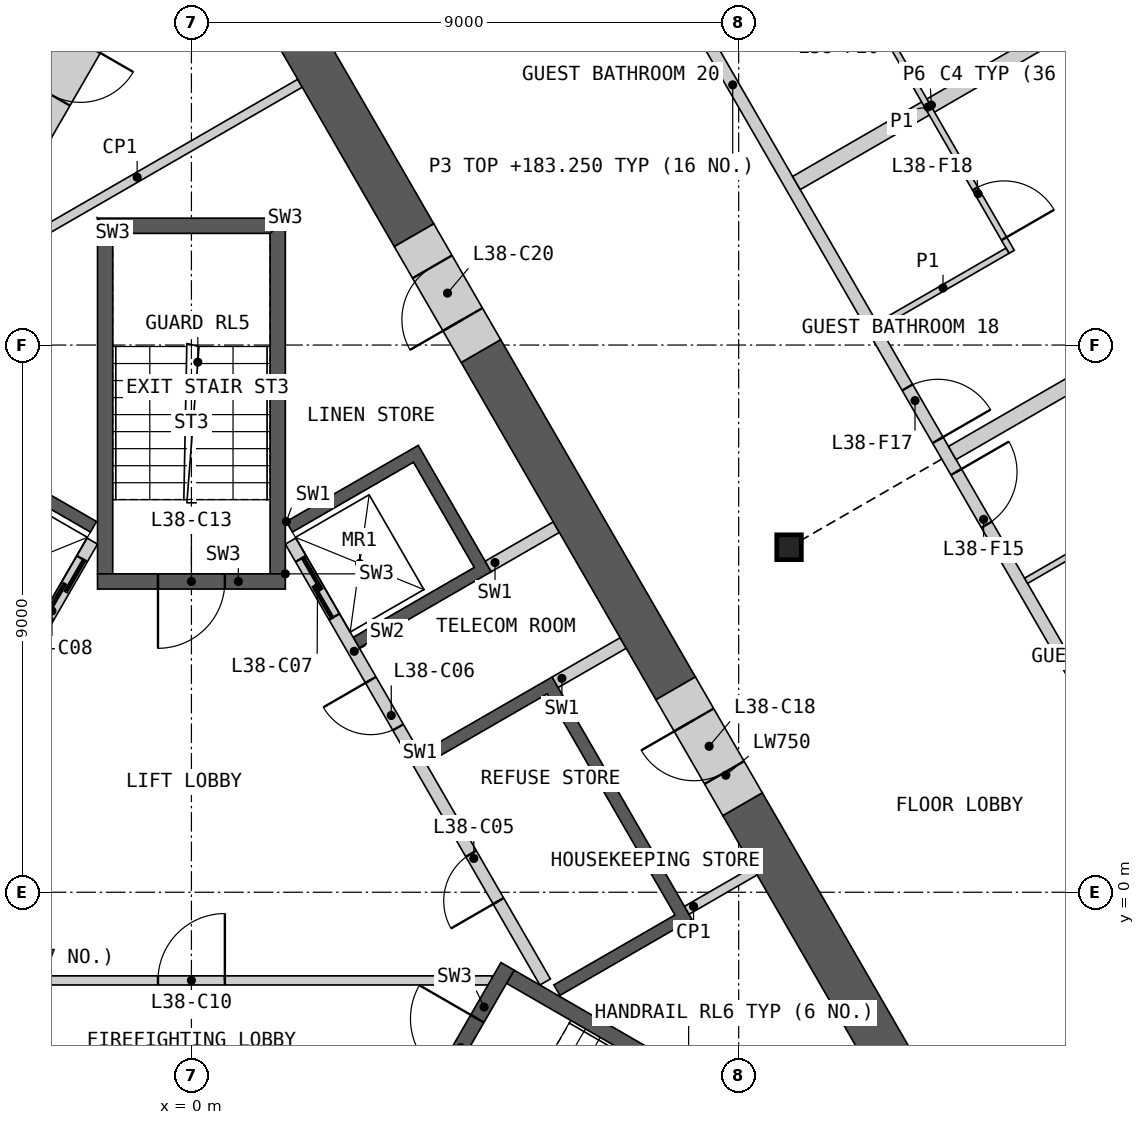
"""IFC4 building model, lengths in metres.
Left out: names, types, materials, properties, quantities, classifications, styles, units other than length and angle.
Written with IfcOpenShell. Run it as: python <this file> out.ifc"""

import sys

from ifc_helpers import new_model, si_unit, direction, frame, frame_2d, origin, origin_2d, place, context, subcontext, project, spatial, polyline, rectangle, i_section, outline, extrude, element, fill, save


model = new_model("IFC4")
c1 = context("Model", 3, precision=1e-05, world=origin(), true_north=direction((0.0, 1.0)))
c2 = subcontext(c1, "Body", "Model", "MODEL_VIEW")
j1 = project(units=[si_unit("LENGTHUNIT", "METRE"), si_unit("PLANEANGLEUNIT", "RADIAN")], contexts=[c1])
p1 = place(None, origin())
s1 = spatial("IfcSite", under=j1, at=p1, CompositionType="ELEMENT")
p2 = place(p1, origin())
s2 = spatial("IfcBuilding", under=s1, at=p2, CompositionType="ELEMENT")
p3 = place(p2, frame((0.0, 0.0, 180.0)))
s3 = spatial("IfcBuildingStorey", under=s2, at=p3, CompositionType="ELEMENT", Elevation=180.0)
p4 = place(p3, frame((9.828, 5.675, 0.0), z_axis=(0.0, 0.0, 1.0), x_axis=(1.0, 0.0, 0.0)))
e1 = element("IfcColumn", 1, at=p4, inside=s3, PredefinedType="COLUMN", context=c2, shape_type="SweptSolid", body=[
    extrude(i_section(OverallWidth=0.404, OverallDepth=0.407, WebThickness=0.027, FlangeThickness=0.044, at=origin_2d()), origin(), (0.0, 0.0, 1.0), 3.6),
])
p5 = place(p3, origin())
e2 = element("IfcWall", 2, at=p5, inside=s3, PredefinedType="SHEAR", context=c2, shape_type="SweptSolid", body=[
    extrude(outline(polyline([(1.561, 6.097), (3.731, 7.35), (4.931, 5.272), (2.76, 4.019), (2.66, 4.192), (4.652, 5.342), (3.652, 7.074), (1.66, 5.924), (1.561, 6.097)])), origin(), (0.0, 0.0, 1.0), 3.25),
])
p6 = place(p3, origin())
e3 = element("IfcWall", 3, at=p6, inside=s3, PredefinedType="SHEAR", context=c2, shape_type="SweptSolid", body=[
    extrude(outline(polyline([(3.76, 2.287), (5.931, 3.54), (8.231, -0.444), (6.061, -1.697), (5.96, -1.524), (7.952, -0.374), (5.852, 3.263), (3.861, 2.113), (3.76, 2.287)])), origin(), (0.0, 0.0, 1.0), 3.25),
])
p7 = place(p3, frame((5.817, -1.476, 0.0), z_axis=(0.0, 0.0, 1.0), x_axis=(-0.500002616675, 0.866023893041, 0.0)))
e4 = element("IfcWall", 4, at=p7, inside=s3, PredefinedType="SOLIDWALL", context=c2, shape_type="SweptSolid", body=[
    extrude(rectangle(XDim=8.373, YDim=0.2, at=frame_2d((4.187, 0.0))), origin(), (0.0, 0.0, 1.0), 3.25),
])
p8 = place(p7, frame((1.537, 0.0, 0.0)))
e5 = element("IfcOpeningElement", 5, at=p8, cuts=e4, PredefinedType="OPENING", context=c2, shape_type="SweptSolid", body=[
    extrude(rectangle(XDim=0.9, YDim=2.1, at=frame_2d((0.45, 1.05))), frame((0.0, 0.11, 0.0), z_axis=(0.0, -1.0, 0.0), x_axis=(1.0, 0.0, 0.0)), (0.0, 0.0, 1.0), 0.22),
])
p9 = place(p7, frame((4.837, 0.0, 0.0)))
e6 = element("IfcOpeningElement", 6, at=p9, cuts=e4, PredefinedType="OPENING", context=c2, shape_type="SweptSolid", body=[
    extrude(rectangle(XDim=0.9, YDim=2.1, at=frame_2d((0.45, 1.05))), frame((0.0, 0.11, 0.0), z_axis=(0.0, -1.0, 0.0), x_axis=(1.0, 0.0, 0.0)), (0.0, 0.0, 1.0), 0.22),
])
p10 = place(p7, frame((6.937, 0.0, 0.0)))
e7 = element("IfcOpeningElement", 7, at=p10, cuts=e4, PredefinedType="OPENING", context=c2, shape_type="SweptSolid", body=[
    extrude(rectangle(XDim=1.1, YDim=2.1, at=frame_2d((0.55, 1.05))), frame((0.0, 0.11, 0.0), z_axis=(0.0, -1.0, 0.0), x_axis=(1.0, 0.0, 0.0)), (0.0, 0.0, 1.0), 0.22),
])
p11 = place(p3, frame((5.981, 3.453, 0.0), z_axis=(0.0, 0.0, 1.0), x_axis=(0.865968639725, 0.500098305348, 0.0)))
e8 = element("IfcWall", 8, at=p11, inside=s3, PredefinedType="SHEAR", context=c2, shape_type="SweptSolid", body=[
    extrude(rectangle(XDim=1.293, YDim=0.2, at=frame_2d((0.646, 0.0))), origin(), (0.0, 0.0, 1.0), 3.25),
])
p12 = place(p3, frame((4.881, 5.358, 0.0), z_axis=(0.0, 0.0, 1.0), x_axis=(0.866084958089, 0.499896834728, 0.0)))
e9 = element("IfcWall", 9, at=p12, inside=s3, PredefinedType="SHEAR", context=c2, shape_type="SweptSolid", body=[
    extrude(rectangle(XDim=1.293, YDim=0.2, at=frame_2d((0.646, 0.0))), origin(), (0.0, 0.0, 1.0), 3.25),
])
p13 = place(p3, origin())
e10 = element("IfcWall", 10, at=p13, inside=s3, PredefinedType="SHEAR", context=c2, shape_type="SweptSolid", body=[
    extrude(outline(polyline([(-4.96, 0.208), (-7.131, 1.461), (-3.731, 7.35), (-1.561, 6.097), (-1.66, 5.924), (-3.652, 7.074), (-4.652, 5.342), (-2.66, 4.192), (-2.76, 4.019), (-4.752, 5.169), (-5.752, 3.437), (-3.76, 2.287), (-3.861, 2.113), (-5.852, 3.263), (-6.852, 1.531), (-4.861, 0.381), (-4.96, 0.208)])), origin(), (0.0, 0.0, 1.0), 3.25),
])
p14 = place(p3, frame((-1.631, 5.776, 0.0), z_axis=(0.0, 0.0, 1.0), x_axis=(-0.499992876559, -0.866029516466, 0.0)))
e11 = element("IfcWall", 11, at=p14, inside=s3, PredefinedType="SOLIDWALL", context=c2, shape_type="SweptSolid", body=[
    extrude(rectangle(XDim=6.486, YDim=0.2, at=frame_2d((3.243, 0.0))), origin(), (0.0, 0.0, 1.0), 3.25),
])
p15 = place(p14, frame((0.337, 0.0, 0.0)))
e12 = element("IfcOpeningElement", 12, at=p15, cuts=e11, PredefinedType="OPENING", context=c2, shape_type="SweptSolid", body=[
    extrude(rectangle(XDim=1.1, YDim=2.1, at=frame_2d((0.55, 1.05))), frame((0.0, 0.11, 0.0), z_axis=(0.0, -1.0, 0.0), x_axis=(1.0, 0.0, 0.0)), (0.0, 0.0, 1.0), 0.22),
])
p16 = place(p14, frame((2.537, 0.0, 0.0)))
e13 = element("IfcOpeningElement", 13, at=p16, cuts=e11, PredefinedType="OPENING", context=c2, shape_type="SweptSolid", body=[
    extrude(rectangle(XDim=1.1, YDim=2.1, at=frame_2d((0.55, 1.05))), frame((0.0, 0.11, 0.0), z_axis=(0.0, -1.0, 0.0), x_axis=(1.0, 0.0, 0.0)), (0.0, 0.0, 1.0), 0.22),
])
p17 = place(p3, frame((-4.941, -1.45, 0.0), z_axis=(0.0, 0.0, 1.0), x_axis=(1.0, 0.0, 0.0)))
e14 = element("IfcWall", 14, at=p17, inside=s3, PredefinedType="PARTITIONING", context=c2, shape_type="SweptSolid", body=[
    extrude(rectangle(XDim=9.882, YDim=0.15, at=frame_2d((4.941, 0.0))), origin(), (0.0, 0.0, 1.0), 3.25),
])
p18 = place(p17, frame((4.391, 0.0, 0.0)))
e15 = element("IfcOpeningElement", 15, at=p18, cuts=e14, PredefinedType="OPENING", context=c2, shape_type="SweptSolid", body=[
    extrude(rectangle(XDim=1.1, YDim=2.1, at=frame_2d((0.55, 1.05))), frame((0.0, 0.085, 0.0), z_axis=(0.0, -1.0, 0.0), x_axis=(1.0, 0.0, 0.0)), (0.0, 0.0, 1.0), 0.17),
])
p19 = place(p3, origin())
e16 = element("IfcWall", 16, at=p19, inside=s3, PredefinedType="SHEAR", context=c2, shape_type="SweptSolid", body=[
    extrude(outline(polyline([(10.032, -4.298), (10.374, -4.206), (5.307, -1.281), (5.182, -1.498), (10.032, -4.298)])), origin(), (0.0, 0.0, 1.0), 3.25),
])
p20 = place(p3, frame((3.655, -3.893, 0.0), z_axis=(0.0, 0.0, 1.0), x_axis=(0.499982516597, 0.866035497597, 0.0)))
e17 = element("IfcWall", 17, at=p20, inside=s3, PredefinedType="SHEAR", context=c2, shape_type="SweptSolid", body=[
    extrude(rectangle(XDim=3.088, YDim=0.25, at=frame_2d((1.544, 0.0))), origin(), (0.0, 0.0, 1.0), 3.25),
])
p21 = place(p20, frame((0.994, 0.0, 0.0)))
e18 = element("IfcOpeningElement", 18, at=p21, cuts=e17, PredefinedType="OPENING", context=c2, shape_type="SweptSolid", body=[
    extrude(rectangle(XDim=1.1, YDim=2.1, at=frame_2d((0.55, 1.05))), frame((0.0, 0.135, 0.0), z_axis=(0.0, -1.0, 0.0), x_axis=(1.0, 0.0, 0.0)), (0.0, 0.0, 1.0), 0.27),
])
p22 = place(p3, origin())
e19 = element("IfcWall", 19, at=p22, inside=s3, PredefinedType="SHEAR", context=c2, shape_type="SweptSolid", body=[
    extrude(outline(polyline([(1.544, 5.237), (1.544, 11.087), (1.294, 10.837), (1.294, 5.237), (1.544, 5.237)])), origin(), (0.0, 0.0, 1.0), 3.25),
])
p23 = place(p3, origin())
e20 = element("IfcWall", 20, at=p23, inside=s3, PredefinedType="SHEAR", context=c2, shape_type="SweptSolid", body=[
    extrude(outline(polyline([(1.544, 11.087), (-1.544, 11.087), (-1.294, 10.837), (1.294, 10.837), (1.544, 11.087)])), origin(), (0.0, 0.0, 1.0), 3.25),
])
p24 = place(p3, origin())
e21 = element("IfcWall", 21, at=p24, inside=s3, PredefinedType="SHEAR", context=c2, shape_type="SweptSolid", body=[
    extrude(outline(polyline([(-1.294, 10.837), (-1.544, 11.087), (-1.544, 5.237), (-1.294, 5.237), (-1.294, 10.837)])), origin(), (0.0, 0.0, 1.0), 3.25),
])
p25 = place(p3, frame((1.544, 5.112, 0.0), z_axis=(0.0, 0.0, 1.0), x_axis=(-1.0, 0.0, 0.0)))
e22 = element("IfcWall", 22, at=p25, inside=s3, PredefinedType="SHEAR", context=c2, shape_type="SweptSolid", body=[
    extrude(rectangle(XDim=3.088, YDim=0.25, at=frame_2d((1.544, 0.0))), origin(), (0.0, 0.0, 1.0), 3.25),
])
p26 = place(p25, frame((0.994, 0.0, 0.0)))
e23 = element("IfcOpeningElement", 23, at=p26, cuts=e22, PredefinedType="OPENING", context=c2, shape_type="SweptSolid", body=[
    extrude(rectangle(XDim=1.1, YDim=2.1, at=frame_2d((0.55, 1.05))), frame((0.0, 0.135, 0.0), z_axis=(0.0, -1.0, 0.0), x_axis=(1.0, 0.0, 0.0)), (0.0, 0.0, 1.0), 0.27),
])
p27 = place(p3, frame((9.266, 0.349, 0.0), z_axis=(0.0, 0.0, 1.0), x_axis=(-0.866003189247, -0.500038474733, 0.0)))
e24 = element("IfcWall", 24, at=p27, inside=s3, PredefinedType="PARTITIONING", context=c2, shape_type="SweptSolid", body=[
    extrude(rectangle(XDim=1.293, YDim=0.15, at=frame_2d((0.646, 0.0))), origin(), (0.0, 0.0, 1.0), 3.25),
])
p28 = place(p3, frame((1.785, 13.306, 0.0), z_axis=(0.0, 0.0, 1.0), x_axis=(-0.866038319186, -0.499977629202, 0.0)))
e25 = element("IfcWall", 25, at=p28, inside=s3, PredefinedType="PARTITIONING", context=c2, shape_type="SweptSolid", body=[
    extrude(rectangle(XDim=6.184, YDim=0.15, at=frame_2d((3.092, 0.0))), origin(), (0.0, 0.0, 1.0), 3.25),
])
p29 = place(p3, frame((3.661, 10.806, 0.0), z_axis=(0.0, 0.0, 1.0), x_axis=(-0.500014865866, 0.866016820803, 0.0)))
e26 = element("IfcWall", 26, at=p29, inside=s3, PredefinedType="SHEAR", context=c2, shape_type="SweptSolid", body=[
    extrude(rectangle(XDim=6.673, YDim=0.75, at=frame_2d((3.336, 0.0))), origin(), (0.0, 0.0, 1.0), 3.25),
])
p30 = place(p3, frame((7.964, 3.354, 0.0), z_axis=(0.0, 0.0, 1.0), x_axis=(-0.50002928721, 0.866008494146, 0.0)))
e27 = element("IfcWall", 27, at=p30, inside=s3, PredefinedType="SHEAR", context=c2, shape_type="SweptSolid", body=[
    extrude(rectangle(XDim=6.405, YDim=0.75, at=frame_2d((3.203, 0.0))), origin(), (0.0, 0.0, 1.0), 3.25),
])
p31 = place(p3, frame((11.527, -2.817, 0.0), z_axis=(0.0, 0.0, 1.0), x_axis=(-0.50001992892, 0.866013897511, 0.0)))
e28 = element("IfcWall", 28, at=p31, inside=s3, PredefinedType="SHEAR", context=c2, shape_type="SweptSolid", body=[
    extrude(rectangle(XDim=4.926, YDim=0.75, at=frame_2d((2.463, 0.0))), origin(), (0.0, 0.0, 1.0), 3.25),
])
p32 = place(p3, frame((9.064, 1.448, 0.0), z_axis=(0.0, 0.0, 1.0), x_axis=(-0.50002983664, 0.866008176907, 0.0)))
e29 = element("IfcWall", 29, at=p32, inside=s3, PredefinedType="SHEAR", context=c2, shape_type="SweptSolid", body=[
    extrude(rectangle(XDim=2.2, YDim=0.75, at=frame_2d((1.1, 0.0))), origin(), (0.0, 0.0, 1.0), 3.25),
])
p33 = place(p32, frame((0.6, 0.0, 0.0)))
e30 = element("IfcOpeningElement", 30, at=p33, cuts=e29, PredefinedType="OPENING", context=c2, shape_type="SweptSolid", body=[
    extrude(rectangle(XDim=1.0, YDim=2.1, at=frame_2d((0.5, 1.05))), frame((0.0, 0.385, 0.0), z_axis=(0.0, -1.0, 0.0), x_axis=(1.0, 0.0, 0.0)), (0.0, 0.0, 1.0), 0.77),
])
p34 = place(p3, frame((4.761, 8.901, 0.0), z_axis=(0.0, 0.0, 1.0), x_axis=(-0.499898558967, 0.866083962871, 0.0)))
e31 = element("IfcWall", 31, at=p34, inside=s3, PredefinedType="SHEAR", context=c2, shape_type="SweptSolid", body=[
    extrude(rectangle(XDim=2.2, YDim=0.75, at=frame_2d((1.1, 0.0))), origin(), (0.0, 0.0, 1.0), 3.25),
])
p35 = place(p34, frame((0.6, 0.0, 0.0)))
e32 = element("IfcOpeningElement", 32, at=p35, cuts=e31, PredefinedType="OPENING", context=c2, shape_type="SweptSolid", body=[
    extrude(rectangle(XDim=1.0, YDim=2.1, at=frame_2d((0.5, 1.05))), frame((0.0, 0.385, 0.0), z_axis=(0.0, -1.0, 0.0), x_axis=(1.0, 0.0, 0.0)), (0.0, 0.0, 1.0), 0.77),
])
p36 = place(p3, frame((-1.522, 14.511, 0.0), z_axis=(0.0, 0.0, 1.0), x_axis=(-0.499946605688, -0.86605622881, 0.0)))
e33 = element("IfcWall", 33, at=p36, inside=s3, PredefinedType="SHEAR", context=c2, shape_type="SweptSolid", body=[
    extrude(rectangle(XDim=2.2, YDim=0.75, at=frame_2d((1.1, 0.0))), origin(), (0.0, 0.0, 1.0), 3.25),
])
p37 = place(p36, frame((0.6, 0.0, 0.0)))
e34 = element("IfcOpeningElement", 34, at=p37, cuts=e33, PredefinedType="OPENING", context=c2, shape_type="SweptSolid", body=[
    extrude(rectangle(XDim=1.0, YDim=2.1, at=frame_2d((0.5, 1.05))), frame((0.0, 0.385, 0.0), z_axis=(0.0, -1.0, 0.0), x_axis=(1.0, 0.0, 0.0)), (0.0, 0.0, 1.0), 0.77),
])
p38 = place(p3, frame((5.377, 19.385, 0.0), z_axis=(0.0, 0.0, 1.0), x_axis=(0.500000757641, -0.86602496636, 0.0)))
e35 = element("IfcWall", 35, at=p38, inside=s3, PredefinedType="PARTITIONING", context=c2, shape_type="SweptSolid", body=[
    extrude(rectangle(XDim=28.198, YDim=0.2, at=frame_2d((14.099, 0.0))), origin(), (0.0, 0.0, 1.0), 3.25),
])
p39 = place(p38, frame((22.735, 0.0, 0.0)))
e36 = element("IfcOpeningElement", 36, at=p39, cuts=e35, PredefinedType="OPENING", context=c2, shape_type="SweptSolid", body=[
    extrude(rectangle(XDim=1.8, YDim=2.1, at=frame_2d((0.9, 1.05))), frame((0.0, 0.11, 0.0), z_axis=(0.0, -1.0, 0.0), x_axis=(1.0, 0.0, 0.0)), (0.0, 0.0, 1.0), 0.22),
])
p40 = place(p38, frame((14.402, 0.0, 0.0)))
e37 = element("IfcOpeningElement", 37, at=p40, cuts=e35, PredefinedType="OPENING", context=c2, shape_type="SweptSolid", body=[
    extrude(rectangle(XDim=1.0, YDim=2.1, at=frame_2d((0.5, 1.05))), frame((0.0, 0.11, 0.0), z_axis=(0.0, -1.0, 0.0), x_axis=(1.0, 0.0, 0.0)), (0.0, 0.0, 1.0), 0.22),
])
p41 = place(p38, frame((12.796, 0.0, 0.0)))
e38 = element("IfcOpeningElement", 38, at=p41, cuts=e35, PredefinedType="OPENING", context=c2, shape_type="SweptSolid", body=[
    extrude(rectangle(XDim=1.0, YDim=2.1, at=frame_2d((0.5, 1.05))), frame((0.0, 0.11, 0.0), z_axis=(0.0, -1.0, 0.0), x_axis=(1.0, 0.0, 0.0)), (0.0, 0.0, 1.0), 0.22),
])
p42 = place(p38, frame((4.164, 0.0, 0.0)))
e39 = element("IfcOpeningElement", 39, at=p42, cuts=e35, PredefinedType="OPENING", context=c2, shape_type="SweptSolid", body=[
    extrude(rectangle(XDim=1.0, YDim=2.1, at=frame_2d((0.5, 1.05))), frame((0.0, 0.11, 0.0), z_axis=(0.0, -1.0, 0.0), x_axis=(1.0, 0.0, 0.0)), (0.0, 0.0, 1.0), 0.22),
])
p43 = place(p38, frame((1.452, 0.0, 0.0)))
e40 = element("IfcOpeningElement", 40, at=p43, cuts=e35, PredefinedType="OPENING", context=c2, shape_type="SweptSolid", body=[
    extrude(rectangle(XDim=0.95, YDim=2.1, at=frame_2d((0.475, 1.05))), frame((0.0, 0.11, 0.0), z_axis=(0.0, -1.0, 0.0), x_axis=(1.0, 0.0, 0.0)), (0.0, 0.0, 1.0), 0.22),
])
p44 = place(p3, frame((12.513, 7.225, 0.0), z_axis=(0.0, 0.0, 1.0), x_axis=(0.866032905446, 0.499987006516, 0.0)))
e41 = element("IfcWall", 41, at=p44, inside=s3, PredefinedType="PARTITIONING", context=c2, shape_type="SweptSolid", body=[
    extrude(rectangle(XDim=9.799, YDim=0.25, at=frame_2d((4.899, 0.0))), origin(), (0.0, 0.0, 1.0), 2.404),
])
p45 = place(p3, frame((9.95, 11.665, 0.0), z_axis=(0.0, 0.0, 1.0), x_axis=(0.86603095744, 0.499990380663, 0.0)))
e42 = element("IfcWall", 42, at=p45, inside=s3, PredefinedType="PARTITIONING", context=c2, shape_type="SweptSolid", body=[
    extrude(rectangle(XDim=5.127, YDim=0.25, at=frame_2d((2.563, 0.0))), origin(), (0.0, 0.0, 1.0), 2.404),
])
p46 = place(p3, frame((10.74, 15.296, 0.0), z_axis=(0.0, 0.0, 1.0), x_axis=(0.500015767406, -0.866016300277, 0.0)))
e43 = element("IfcWall", 43, at=p46, inside=s3, PredefinedType="PARTITIONING", context=c2, shape_type="SweptSolid", body=[
    extrude(rectangle(XDim=5.5, YDim=0.1, at=frame_2d((2.75, 0.0))), origin(), (0.0, 0.0, 1.0), 2.404),
])
p47 = place(p46, frame((4.3, 0.0, 0.0)))
e44 = element("IfcOpeningElement", 44, at=p47, cuts=e43, PredefinedType="OPENING", context=c2, shape_type="SweptSolid", body=[
    extrude(rectangle(XDim=0.95, YDim=2.1, at=frame_2d((0.475, 1.05))), frame((0.0, 0.06, 0.0), z_axis=(0.0, -1.0, 0.0), x_axis=(1.0, 0.0, 0.0)), (0.0, 0.0, 1.0), 0.12),
])
p48 = place(p46, frame((0.25, 0.0, 0.0)))
e45 = element("IfcOpeningElement", 45, at=p48, cuts=e43, PredefinedType="OPENING", context=c2, shape_type="SweptSolid", body=[
    extrude(rectangle(XDim=0.95, YDim=2.1, at=frame_2d((0.475, 1.05))), frame((0.0, 0.06, 0.0), z_axis=(0.0, -1.0, 0.0), x_axis=(1.0, 0.0, 0.0)), (0.0, 0.0, 1.0), 0.12),
])
p49 = place(p3, frame((13.727, 5.123, 0.0), z_axis=(0.0, 0.0, 1.0), x_axis=(0.866032905446, 0.499987006516, 0.0)))
e46 = element("IfcWall", 46, at=p49, inside=s3, PredefinedType="PARTITIONING", context=c2, shape_type="SweptSolid", body=[
    extrude(rectangle(XDim=2.45, YDim=0.1, at=frame_2d((1.225, 0.0))), origin(), (0.0, 0.0, 1.0), 2.404),
])
p50 = place(p3, frame((11.3, 9.326, 0.0), z_axis=(0.0, 0.0, 1.0), x_axis=(0.866014668023, 0.500018594424, 0.0)))
e47 = element("IfcWall", 47, at=p50, inside=s3, PredefinedType="PARTITIONING", context=c2, shape_type="SweptSolid", body=[
    extrude(rectangle(XDim=2.45, YDim=0.1, at=frame_2d((1.225, 0.0))), origin(), (0.0, 0.0, 1.0), 2.404),
])
p51 = place(p8, origin())
e48 = element("IfcDoor", 48, at=p51, inside=s3, OperationType="SINGLE_SWING_LEFT", PredefinedType="DOOR", context=c2, shape_type="SweptSolid", body=[
    extrude(rectangle(XDim=0.9, YDim=2.1, at=frame_2d((0.45, 1.05))), frame((0.0, 0.025, 0.0), z_axis=(0.0, -1.0, 0.0), x_axis=(1.0, 0.0, 0.0)), (0.0, 0.0, 1.0), 0.05),
])
fill(e5, e48)
p52 = place(p9, origin())
e49 = element("IfcDoor", 49, at=p52, inside=s3, OperationType="SINGLE_SWING_RIGHT", PredefinedType="DOOR", context=c2, shape_type="SweptSolid", body=[
    extrude(rectangle(XDim=0.9, YDim=2.1, at=frame_2d((0.45, 1.05))), frame((0.0, 0.025, 0.0), z_axis=(0.0, -1.0, 0.0), x_axis=(1.0, 0.0, 0.0)), (0.0, 0.0, 1.0), 0.05),
])
fill(e6, e49)
p53 = place(p10, origin())
e50 = element("IfcDoor", 50, at=p53, inside=s3, OperationType="SLIDING_TO_LEFT", PredefinedType="DOOR", context=c2, shape_type="SweptSolid", body=[
    extrude(rectangle(XDim=1.1, YDim=2.1, at=frame_2d((0.55, 1.05))), frame((0.0, 0.025, 0.0), z_axis=(0.0, -1.0, 0.0), x_axis=(1.0, 0.0, 0.0)), (0.0, 0.0, 1.0), 0.05),
])
fill(e7, e50)
p54 = place(p15, origin())
e51 = element("IfcDoor", 51, at=p54, inside=s3, OperationType="SLIDING_TO_LEFT", PredefinedType="DOOR", context=c2, shape_type="SweptSolid", body=[
    extrude(rectangle(XDim=1.1, YDim=2.1, at=frame_2d((0.55, 1.05))), frame((0.0, 0.025, 0.0), z_axis=(0.0, -1.0, 0.0), x_axis=(1.0, 0.0, 0.0)), (0.0, 0.0, 1.0), 0.05),
])
fill(e12, e51)
p55 = place(p18, origin())
e52 = element("IfcDoor", 52, at=p55, inside=s3, OperationType="SINGLE_SWING_RIGHT", PredefinedType="DOOR", context=c2, shape_type="SweptSolid", body=[
    extrude(rectangle(XDim=1.1, YDim=2.1, at=frame_2d((0.55, 1.05))), frame((0.0, 0.025, 0.0), z_axis=(0.0, -1.0, 0.0), x_axis=(1.0, 0.0, 0.0)), (0.0, 0.0, 1.0), 0.05),
])
fill(e15, e52)
p56 = place(p21, origin())
e53 = element("IfcDoor", 53, at=p56, inside=s3, OperationType="SINGLE_SWING_RIGHT", PredefinedType="DOOR", context=c2, shape_type="SweptSolid", body=[
    extrude(rectangle(XDim=1.1, YDim=2.1, at=frame_2d((0.55, 1.05))), frame((0.0, 0.025, 0.0), z_axis=(0.0, -1.0, 0.0), x_axis=(1.0, 0.0, 0.0)), (0.0, 0.0, 1.0), 0.05),
])
fill(e18, e53)
p57 = place(p26, origin())
e54 = element("IfcDoor", 54, at=p57, inside=s3, OperationType="SINGLE_SWING_RIGHT", PredefinedType="DOOR", context=c2, shape_type="SweptSolid", body=[
    extrude(rectangle(XDim=1.1, YDim=2.1, at=frame_2d((0.55, 1.05))), frame((0.0, 0.025, 0.0), z_axis=(0.0, -1.0, 0.0), x_axis=(1.0, 0.0, 0.0)), (0.0, 0.0, 1.0), 0.05),
])
fill(e23, e54)
p58 = place(p33, origin())
e55 = element("IfcDoor", 55, at=p58, inside=s3, OperationType="SINGLE_SWING_RIGHT", PredefinedType="DOOR", context=c2, shape_type="SweptSolid", body=[
    extrude(rectangle(XDim=1.0, YDim=2.1, at=frame_2d((0.5, 1.05))), frame((0.0, 0.13, 0.0), z_axis=(0.0, -1.0, 0.0), x_axis=(1.0, 0.0, 0.0)), (0.0, 0.0, 1.0), 0.05),
])
fill(e30, e55)
p59 = place(p35, origin())
e56 = element("IfcDoor", 56, at=p59, inside=s3, OperationType="SINGLE_SWING_LEFT", PredefinedType="DOOR", context=c2, shape_type="SweptSolid", body=[
    extrude(rectangle(XDim=1.0, YDim=2.1, at=frame_2d((0.5, 1.05))), frame((0.0, 0.13, 0.0), z_axis=(0.0, -1.0, 0.0), x_axis=(1.0, 0.0, 0.0)), (0.0, 0.0, 1.0), 0.05),
])
fill(e32, e56)
p60 = place(p37, origin())
e57 = element("IfcDoor", 57, at=p60, inside=s3, OperationType="SINGLE_SWING_LEFT", PredefinedType="DOOR", context=c2, shape_type="SweptSolid", body=[
    extrude(rectangle(XDim=1.0, YDim=2.1, at=frame_2d((0.5, 1.05))), frame((0.0, 0.13, 0.0), z_axis=(0.0, -1.0, 0.0), x_axis=(1.0, 0.0, 0.0)), (0.0, 0.0, 1.0), 0.05),
])
fill(e34, e57)
p61 = place(p40, origin())
e58 = element("IfcDoor", 58, at=p61, inside=s3, OperationType="SINGLE_SWING_LEFT", PredefinedType="DOOR", context=c2, shape_type="SweptSolid", body=[
    extrude(rectangle(XDim=1.0, YDim=2.1, at=frame_2d((0.5, 1.05))), frame((0.0, 0.025, 0.0), z_axis=(0.0, -1.0, 0.0), x_axis=(1.0, 0.0, 0.0)), (0.0, 0.0, 1.0), 0.05),
])
fill(e37, e58)
p62 = place(p41, origin())
e59 = element("IfcDoor", 59, at=p62, inside=s3, OperationType="SINGLE_SWING_RIGHT", PredefinedType="DOOR", context=c2, shape_type="SweptSolid", body=[
    extrude(rectangle(XDim=1.0, YDim=2.1, at=frame_2d((0.5, 1.05))), frame((0.0, 0.025, 0.0), z_axis=(0.0, -1.0, 0.0), x_axis=(1.0, 0.0, 0.0)), (0.0, 0.0, 1.0), 0.05),
])
fill(e38, e59)
p63 = place(p47, origin())
e60 = element("IfcDoor", 60, at=p63, inside=s3, OperationType="SINGLE_SWING_RIGHT", PredefinedType="DOOR", context=c2, shape_type="SweptSolid", body=[
    extrude(rectangle(XDim=0.95, YDim=2.1, at=frame_2d((0.475, 1.05))), frame((0.0, 0.025, 0.0), z_axis=(0.0, -1.0, 0.0), x_axis=(1.0, 0.0, 0.0)), (0.0, 0.0, 1.0), 0.05),
])
fill(e44, e60)
save(model, sys.argv[1])
